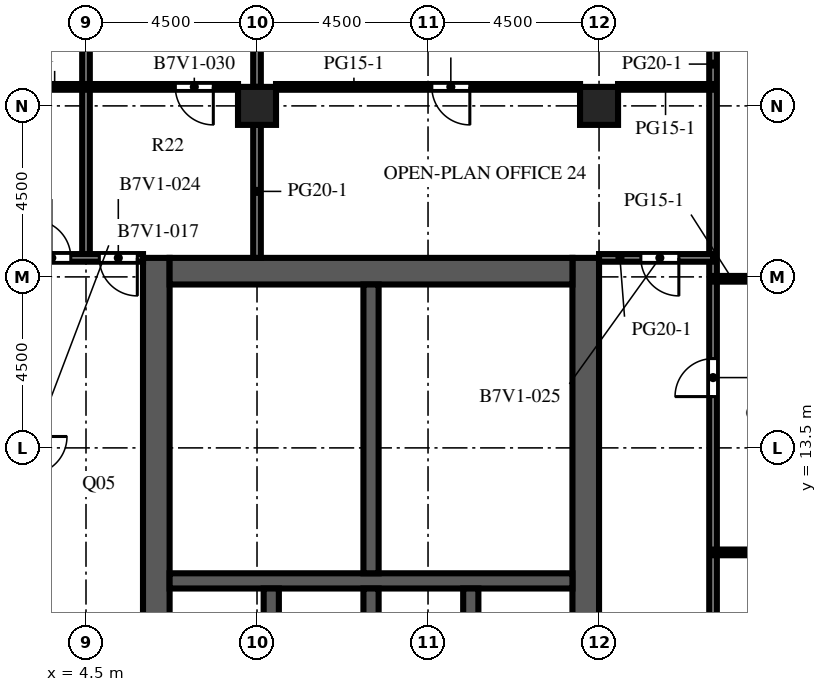
"""IFC4 building model, lengths in metres.
Left out: names, types, materials, properties, quantities, classifications, styles, units other than length and angle.
Written with IfcOpenShell. Run it as: python <this file> out.ifc"""

import sys

from ifc_helpers import new_model, si_unit, direction, frame, frame_2d, origin, origin_2d, place, context, subcontext, project, spatial, rectangle, extrude, element, fill, save


model = new_model("IFC4")
c1 = context("Model", 3, precision=1e-05, world=origin(), true_north=direction((0.0, 1.0)))
c2 = subcontext(c1, "Body", "Model", "MODEL_VIEW")
j1 = project(units=[si_unit("LENGTHUNIT", "METRE"), si_unit("PLANEANGLEUNIT", "RADIAN")], contexts=[c1])
p1 = place(None, origin())
s1 = spatial("IfcSite", under=j1, at=p1, CompositionType="ELEMENT")
p2 = place(p1, origin())
s2 = spatial("IfcBuilding", under=s1, at=p2, CompositionType="ELEMENT")
p3 = place(p2, frame((0.0, 0.0, 252.1)))
s3 = spatial("IfcBuildingStorey", under=s2, at=p3, CompositionType="ELEMENT", Elevation=252.1)
for number, where, z_axis, x_axis in (
    (1, (9.0, 22.5, 0.0), (0.0, 0.0, 1.0), (1.0, 0.0, 0.0)),
    (2, (18.0, 22.5, 0.0), (0.0, 0.0, 1.0), (1.0, 0.0, 0.0)),
):
    element("IfcColumn", number, at=place(p3, frame(where, z_axis=z_axis, x_axis=x_axis)), inside=s3, PredefinedType="COLUMN", context=c2, shape_type="SweptSolid", body=[
        extrude(rectangle(XDim=1.0, YDim=1.0, at=origin_2d()), origin(), (0.0, 0.0, 1.0), 4.1),
    ])
p4 = place(p3, frame((6.35, -9.0, 0.0), z_axis=(0.0, 0.0, 1.0), x_axis=(0.0, 1.0, 0.0)))
e3 = element("IfcWall", 3, at=p4, inside=s3, PredefinedType="SHEAR", context=c2, shape_type="SweptSolid", body=[
    extrude(rectangle(XDim=27.5, YDim=0.7, at=frame_2d((13.75, 0.0))), origin(), (0.0, 0.0, 1.0), 4.1),
])
p5 = place(p4, frame((12.55, 0.0, 0.0)))
e4 = element("IfcOpeningElement", 4, at=p5, cuts=e3, PredefinedType="OPENING", context=c2, shape_type="SweptSolid", body=[
    extrude(rectangle(XDim=2.4, YDim=2.4, at=frame_2d((1.2, 1.2))), frame((0.0, 0.36, 0.0), z_axis=(0.0, -1.0, 0.0), x_axis=(1.0, 0.0, 0.0)), (0.0, 0.0, 1.0), 0.72),
])
p6 = place(p4, frame((3.9, 0.0, 0.0)))
e5 = element("IfcOpeningElement", 5, at=p6, cuts=e3, PredefinedType="OPENING", context=c2, shape_type="SweptSolid", body=[
    extrude(rectangle(XDim=1.2, YDim=2.1, at=frame_2d((0.6, 1.05))), frame((0.0, 0.36, 0.0), z_axis=(0.0, -1.0, 0.0), x_axis=(1.0, 0.0, 0.0)), (0.0, 0.0, 1.0), 0.72),
])
p7 = place(p4, frame((22.4, 0.0, 0.0)))
e6 = element("IfcOpeningElement", 6, at=p7, cuts=e3, PredefinedType="OPENING", context=c2, shape_type="SweptSolid", body=[
    extrude(rectangle(XDim=1.2, YDim=2.1, at=frame_2d((0.6, 1.05))), frame((0.0, 0.36, 0.0), z_axis=(0.0, -1.0, 0.0), x_axis=(1.0, 0.0, 0.0)), (0.0, 0.0, 1.0), 0.72),
])
p8 = place(p3, frame((17.65, -9.0, 0.0), z_axis=(0.0, 0.0, 1.0), x_axis=(0.0, 1.0, 0.0)))
e7 = element("IfcWall", 7, at=p8, inside=s3, PredefinedType="SHEAR", context=c2, shape_type="SweptSolid", body=[
    extrude(rectangle(XDim=27.5, YDim=0.7, at=frame_2d((13.75, 0.0))), origin(), (0.0, 0.0, 1.0), 4.1),
])
p9 = place(p8, frame((12.55, 0.0, 0.0)))
e8 = element("IfcOpeningElement", 8, at=p9, cuts=e7, PredefinedType="OPENING", context=c2, shape_type="SweptSolid", body=[
    extrude(rectangle(XDim=2.4, YDim=2.4, at=frame_2d((1.2, 1.2))), frame((0.0, 0.36, 0.0), z_axis=(0.0, -1.0, 0.0), x_axis=(1.0, 0.0, 0.0)), (0.0, 0.0, 1.0), 0.72),
])
p10 = place(p8, frame((6.825, 0.0, 0.0)))
e9 = element("IfcOpeningElement", 9, at=p10, cuts=e7, PredefinedType="OPENING", context=c2, shape_type="SweptSolid", body=[
    extrude(rectangle(XDim=1.2, YDim=2.1, at=frame_2d((0.6, 1.05))), frame((0.0, 0.36, 0.0), z_axis=(0.0, -1.0, 0.0), x_axis=(1.0, 0.0, 0.0)), (0.0, 0.0, 1.0), 0.72),
])
p11 = place(p8, frame((19.475, 0.0, 0.0)))
e10 = element("IfcOpeningElement", 10, at=p11, cuts=e7, PredefinedType="OPENING", context=c2, shape_type="SweptSolid", body=[
    extrude(rectangle(XDim=1.2, YDim=2.1, at=frame_2d((0.6, 1.05))), frame((0.0, 0.36, 0.0), z_axis=(0.0, -1.0, 0.0), x_axis=(1.0, 0.0, 0.0)), (0.0, 0.0, 1.0), 0.72),
])
p12 = place(p3, frame((6.7, 18.15, 0.0), z_axis=(0.0, 0.0, 1.0), x_axis=(1.0, 0.0, 0.0)))
e11 = element("IfcWall", 11, at=p12, inside=s3, PredefinedType="SHEAR", context=c2, shape_type="SweptSolid", body=[
    extrude(rectangle(XDim=10.6, YDim=0.7, at=frame_2d((5.3, 0.0))), origin(), (0.0, 0.0, 1.0), 4.1),
])
p13 = place(p3, frame((6.7, 10.0, 0.0), z_axis=(0.0, 0.0, 1.0), x_axis=(1.0, 0.0, 0.0)))
e12 = element("IfcWall", 12, at=p13, inside=s3, PredefinedType="SHEAR", context=c2, shape_type="SweptSolid", body=[
    extrude(rectangle(XDim=10.6, YDim=0.4, at=frame_2d((5.3, 0.0))), origin(), (0.0, 0.0, 1.0), 4.1),
])
for number, where, z_axis, x_axis in (
    (13, (9.375, 6.9, 0.0), (0.0, 0.0, 1.0), (0.0, 1.0, 0.0)),
    (14, (12.0, 6.9, 0.0), (0.0, 0.0, 1.0), (0.0, 1.0, 0.0)),
    (15, (14.625, 6.9, 0.0), (0.0, 0.0, 1.0), (0.0, 1.0, 0.0)),
):
    element("IfcWall", number, at=place(p3, frame(where, z_axis=z_axis, x_axis=x_axis)), inside=s3, PredefinedType="SHEAR", context=c2, shape_type="SweptSolid", body=[
        extrude(rectangle(XDim=2.9, YDim=0.4, at=frame_2d((1.45, 0.0))), origin(), (0.0, 0.0, 1.0), 4.1),
    ])
p14 = place(p3, frame((12.0, 10.2, 0.0), z_axis=(0.0, 0.0, 1.0), x_axis=(0.0, 1.0, 0.0)))
e16 = element("IfcWall", 16, at=p14, inside=s3, PredefinedType="SHEAR", context=c2, shape_type="SweptSolid", body=[
    extrude(rectangle(XDim=7.6, YDim=0.4, at=frame_2d((3.8, 0.0))), origin(), (0.0, 0.0, 1.0), 4.1),
])
p15 = place(p3, frame((8.1, 10.2, 0.0), z_axis=(0.0, 0.0, 1.0), x_axis=(0.0, 1.0, 0.0)))
e17 = element("IfcWall", 17, at=p15, inside=s3, PredefinedType="PARTITIONING", context=c2, shape_type="SweptSolid", body=[
    extrude(rectangle(XDim=2.28, YDim=0.1, at=frame_2d((1.14, 0.0))), origin(), (0.0, 0.0, 1.0), 3.65),
])
p16 = place(p15, frame((0.64, 0.0, 0.0)))
e18 = element("IfcOpeningElement", 18, at=p16, cuts=e17, PredefinedType="OPENING", context=c2, shape_type="SweptSolid", body=[
    extrude(rectangle(XDim=1.0, YDim=2.1, at=frame_2d((0.5, 1.05))), frame((0.0, 0.06, 0.0), z_axis=(0.0, -1.0, 0.0), x_axis=(1.0, 0.0, 0.0)), (0.0, 0.0, 1.0), 0.12),
])
p17 = place(p3, frame((8.1, 12.48, 0.0), z_axis=(0.0, 0.0, 1.0), x_axis=(0.0, 1.0, 0.0)))
e19 = element("IfcWall", 19, at=p17, inside=s3, PredefinedType="PARTITIONING", context=c2, shape_type="SweptSolid", body=[
    extrude(rectangle(XDim=2.432, YDim=0.1, at=frame_2d((1.216, 0.0))), origin(), (0.0, 0.0, 1.0), 3.65),
])
p18 = place(p17, frame((0.716, 0.0, 0.0)))
e20 = element("IfcOpeningElement", 20, at=p18, cuts=e19, PredefinedType="OPENING", context=c2, shape_type="SweptSolid", body=[
    extrude(rectangle(XDim=1.0, YDim=2.1, at=frame_2d((0.5, 1.05))), frame((0.0, 0.06, 0.0), z_axis=(0.0, -1.0, 0.0), x_axis=(1.0, 0.0, 0.0)), (0.0, 0.0, 1.0), 0.12),
])
p19 = place(p3, frame((8.1, 14.912, 0.0), z_axis=(0.0, 0.0, 1.0), x_axis=(0.0, 1.0, 0.0)))
e21 = element("IfcWall", 21, at=p19, inside=s3, PredefinedType="PARTITIONING", context=c2, shape_type="SweptSolid", body=[
    extrude(rectangle(XDim=2.888, YDim=0.1, at=frame_2d((1.444, 0.0))), origin(), (0.0, 0.0, 1.0), 3.65),
])
p20 = place(p19, frame((0.944, 0.0, 0.0)))
e22 = element("IfcOpeningElement", 22, at=p20, cuts=e21, PredefinedType="OPENING", context=c2, shape_type="SweptSolid", body=[
    extrude(rectangle(XDim=1.0, YDim=2.1, at=frame_2d((0.5, 1.05))), frame((0.0, 0.06, 0.0), z_axis=(0.0, -1.0, 0.0), x_axis=(1.0, 0.0, 0.0)), (0.0, 0.0, 1.0), 0.12),
])
for number, where, z_axis, x_axis in (
    (23, (8.1, 12.48, 0.0), (0.0, 0.0, 1.0), (1.0, 0.0, 0.0)),
    (24, (8.1, 14.912, 0.0), (0.0, 0.0, 1.0), (1.0, 0.0, 0.0)),
):
    element("IfcWall", number, at=place(p3, frame(where, z_axis=z_axis, x_axis=x_axis)), inside=s3, PredefinedType="PARTITIONING", context=c2, shape_type="SweptSolid", body=[
        extrude(rectangle(XDim=3.7, YDim=0.1, at=frame_2d((1.85, 0.0))), origin(), (0.0, 0.0, 1.0), 3.65),
    ])
p21 = place(p3, frame((4.5, 18.5, 0.0), z_axis=(0.0, 0.0, 1.0), x_axis=(0.0, 1.0, 0.0)))
e25 = element("IfcWall", 25, at=p21, inside=s3, PredefinedType="PARTITIONING", context=c2, shape_type="SweptSolid", body=[
    extrude(rectangle(XDim=12.6, YDim=0.2, at=frame_2d((6.3, 0.0))), origin(), (0.0, 0.0, 1.0), 3.65),
])
for number, where, z_axis, x_axis in (
    (26, (9.0, 18.5, 0.0), (0.0, 0.0, 1.0), (0.0, 1.0, 0.0)),
    (27, (9.0, 23.0, 0.0), (0.0, 0.0, 1.0), (0.0, 1.0, 0.0)),
):
    element("IfcWall", number, at=place(p3, frame(where, z_axis=z_axis, x_axis=x_axis)), inside=s3, PredefinedType="PARTITIONING", context=c2, shape_type="SweptSolid", body=[
        extrude(rectangle(XDim=3.5, YDim=0.2, at=frame_2d((1.75, 0.0))), origin(), (0.0, 0.0, 1.0), 3.65),
    ])
p22 = place(p3, frame((21.0, 31.35, 0.0), z_axis=(0.0, 0.0, 1.0), x_axis=(0.0, -1.0, 0.0)))
e28 = element("IfcWall", 28, at=p22, inside=s3, PredefinedType="PARTITIONING", context=c2, shape_type="SweptSolid", body=[
    extrude(rectangle(XDim=25.1, YDim=0.2, at=frame_2d((12.55, 0.0))), origin(), (0.0, 0.0, 1.0), 3.65),
])
p23 = place(p22, frame((15.5, 0.0, 0.0)))
e29 = element("IfcOpeningElement", 29, at=p23, cuts=e28, PredefinedType="OPENING", context=c2, shape_type="SweptSolid", body=[
    extrude(rectangle(XDim=1.0, YDim=2.1, at=frame_2d((0.5, 1.05))), frame((0.0, 0.11, 0.0), z_axis=(0.0, -1.0, 0.0), x_axis=(1.0, 0.0, 0.0)), (0.0, 0.0, 1.0), 0.22),
])
p24 = place(p3, frame((26.85, 10.75, 0.0), z_axis=(0.0, 0.0, 1.0), x_axis=(-1.0, 0.0, 0.0)))
e30 = element("IfcWall", 30, at=p24, inside=s3, PredefinedType="PARTITIONING", context=c2, shape_type="SweptSolid", body=[
    extrude(rectangle(XDim=5.85, YDim=0.15, at=frame_2d((2.925, 0.0))), origin(), (0.0, 0.0, 1.0), 3.65),
])
p25 = place(p24, frame((2.0, 0.0, 0.0)))
e31 = element("IfcOpeningElement", 31, at=p25, cuts=e30, PredefinedType="OPENING", context=c2, shape_type="SweptSolid", body=[
    extrude(rectangle(XDim=1.0, YDim=2.1, at=frame_2d((0.5, 1.05))), frame((0.0, 0.085, 0.0), z_axis=(0.0, -1.0, 0.0), x_axis=(1.0, 0.0, 0.0)), (0.0, 0.0, 1.0), 0.17),
])
p26 = place(p3, frame((21.0, 17.95, 0.0), z_axis=(0.0, 0.0, 1.0), x_axis=(1.0, 0.0, 0.0)))
e32 = element("IfcWall", 32, at=p26, inside=s3, PredefinedType="PARTITIONING", context=c2, shape_type="SweptSolid", body=[
    extrude(rectangle(XDim=1.0, YDim=0.15, at=frame_2d((0.5, 0.0))), origin(), (0.0, 0.0, 1.0), 3.65),
])
p27 = place(p3, frame((1.5, 18.5, 0.0), z_axis=(0.0, 0.0, 1.0), x_axis=(1.0, 0.0, 0.0)))
e33 = element("IfcWall", 33, at=p27, inside=s3, PredefinedType="PARTITIONING", context=c2, shape_type="SweptSolid", body=[
    extrude(rectangle(XDim=4.5, YDim=0.2, at=frame_2d((2.25, 0.0))), origin(), (0.0, 0.0, 1.0), 3.65),
])
p28 = place(p27, frame((1.6, 0.0, 0.0)))
e34 = element("IfcOpeningElement", 34, at=p28, cuts=e33, PredefinedType="OPENING", context=c2, shape_type="SweptSolid", body=[
    extrude(rectangle(XDim=1.0, YDim=2.1, at=frame_2d((0.5, 1.05))), frame((0.0, 0.11, 0.0), z_axis=(0.0, -1.0, 0.0), x_axis=(1.0, 0.0, 0.0)), (0.0, 0.0, 1.0), 0.22),
])
p29 = place(p27, frame((3.35, 0.0, 0.0)))
e35 = element("IfcOpeningElement", 35, at=p29, cuts=e33, PredefinedType="OPENING", context=c2, shape_type="SweptSolid", body=[
    extrude(rectangle(XDim=1.0, YDim=2.1, at=frame_2d((0.5, 1.05))), frame((0.0, 0.11, 0.0), z_axis=(0.0, -1.0, 0.0), x_axis=(1.0, 0.0, 0.0)), (0.0, 0.0, 1.0), 0.22),
])
p30 = place(p3, frame((18.0, 18.5, 0.0), z_axis=(0.0, 0.0, 1.0), x_axis=(1.0, 0.0, 0.0)))
e36 = element("IfcWall", 36, at=p30, inside=s3, PredefinedType="PARTITIONING", context=c2, shape_type="SweptSolid", body=[
    extrude(rectangle(XDim=3.0, YDim=0.2, at=frame_2d((1.5, 0.0))), origin(), (0.0, 0.0, 1.0), 3.65),
])
p31 = place(p30, frame((1.1, 0.0, 0.0)))
e37 = element("IfcOpeningElement", 37, at=p31, cuts=e36, PredefinedType="OPENING", context=c2, shape_type="SweptSolid", body=[
    extrude(rectangle(XDim=1.0, YDim=2.1, at=frame_2d((0.5, 1.05))), frame((0.0, 0.11, 0.0), z_axis=(0.0, -1.0, 0.0), x_axis=(1.0, 0.0, 0.0)), (0.0, 0.0, 1.0), 0.22),
])
p32 = place(p3, frame((0.5, 23.0, 0.0), z_axis=(0.0, 0.0, 1.0), x_axis=(1.0, 0.0, 0.0)))
e38 = element("IfcWall", 38, at=p32, inside=s3, PredefinedType="PARTITIONING", context=c2, shape_type="SweptSolid", body=[
    extrude(rectangle(XDim=8.0, YDim=0.15, at=frame_2d((4.0, 0.0))), origin(), (0.0, 0.0, 1.0), 3.65),
])
p33 = place(p32, frame((6.35, 0.0, 0.0)))
e39 = element("IfcOpeningElement", 39, at=p33, cuts=e38, PredefinedType="OPENING", context=c2, shape_type="SweptSolid", body=[
    extrude(rectangle(XDim=1.0, YDim=2.1, at=frame_2d((0.5, 1.05))), frame((0.0, 0.085, 0.0), z_axis=(0.0, -1.0, 0.0), x_axis=(1.0, 0.0, 0.0)), (0.0, 0.0, 1.0), 0.17),
])
p34 = place(p3, frame((9.5, 23.0, 0.0), z_axis=(0.0, 0.0, 1.0), x_axis=(1.0, 0.0, 0.0)))
e40 = element("IfcWall", 40, at=p34, inside=s3, PredefinedType="PARTITIONING", context=c2, shape_type="SweptSolid", body=[
    extrude(rectangle(XDim=8.0, YDim=0.15, at=frame_2d((4.0, 0.0))), origin(), (0.0, 0.0, 1.0), 3.65),
])
p35 = place(p34, frame((4.1, 0.0, 0.0)))
e41 = element("IfcOpeningElement", 41, at=p35, cuts=e40, PredefinedType="OPENING", context=c2, shape_type="SweptSolid", body=[
    extrude(rectangle(XDim=1.0, YDim=2.1, at=frame_2d((0.5, 1.05))), frame((0.0, 0.085, 0.0), z_axis=(0.0, -1.0, 0.0), x_axis=(1.0, 0.0, 0.0)), (0.0, 0.0, 1.0), 0.17),
])
p36 = place(p3, frame((18.5, 23.0, 0.0), z_axis=(0.0, 0.0, 1.0), x_axis=(1.0, 0.0, 0.0)))
e42 = element("IfcWall", 42, at=p36, inside=s3, PredefinedType="PARTITIONING", context=c2, shape_type="SweptSolid", body=[
    extrude(rectangle(XDim=2.5, YDim=0.15, at=frame_2d((1.25, 0.0))), origin(), (0.0, 0.0, 1.0), 3.65),
])
p37 = place(p11, frame((1.2, 0.0, 0.0), z_axis=(0.0, 0.0, 1.0), x_axis=(-1.0, 0.0, 0.0)))
e43 = element("IfcDoor", 43, at=p37, inside=s3, OperationType="SINGLE_SWING_LEFT", PredefinedType="DOOR", context=c2, shape_type="SweptSolid", body=[
    extrude(rectangle(XDim=1.2, YDim=2.1, at=frame_2d((0.6, 1.05))), frame((0.0, 0.025, 0.0), z_axis=(0.0, -1.0, 0.0), x_axis=(1.0, 0.0, 0.0)), (0.0, 0.0, 1.0), 0.05),
])
fill(e10, e43)
p38 = place(p7, origin())
e44 = element("IfcDoor", 44, at=p38, inside=s3, OperationType="SINGLE_SWING_RIGHT", PredefinedType="DOOR", context=c2, shape_type="SweptSolid", body=[
    extrude(rectangle(XDim=1.2, YDim=2.1, at=frame_2d((0.6, 1.05))), frame((0.0, -0.275, 0.0), z_axis=(0.0, -1.0, 0.0), x_axis=(1.0, 0.0, 0.0)), (0.0, 0.0, 1.0), 0.05),
])
fill(e6, e44)
p39 = place(p16, origin())
e45 = element("IfcDoor", 45, at=p39, inside=s3, OperationType="SINGLE_SWING_LEFT", PredefinedType="DOOR", context=c2, shape_type="SweptSolid", body=[
    extrude(rectangle(XDim=1.0, YDim=2.1, at=frame_2d((0.5, 1.05))), frame((0.0, 0.025, 0.0), z_axis=(0.0, -1.0, 0.0), x_axis=(1.0, 0.0, 0.0)), (0.0, 0.0, 1.0), 0.05),
])
fill(e18, e45)
p40 = place(p18, origin())
e46 = element("IfcDoor", 46, at=p40, inside=s3, OperationType="SINGLE_SWING_RIGHT", PredefinedType="DOOR", context=c2, shape_type="SweptSolid", body=[
    extrude(rectangle(XDim=1.0, YDim=2.1, at=frame_2d((0.5, 1.05))), frame((0.0, 0.025, 0.0), z_axis=(0.0, -1.0, 0.0), x_axis=(1.0, 0.0, 0.0)), (0.0, 0.0, 1.0), 0.05),
])
fill(e20, e46)
p41 = place(p20, origin())
e47 = element("IfcDoor", 47, at=p41, inside=s3, OperationType="SINGLE_SWING_LEFT", PredefinedType="DOOR", context=c2, shape_type="SweptSolid", body=[
    extrude(rectangle(XDim=1.0, YDim=2.1, at=frame_2d((0.5, 1.05))), frame((0.0, 0.025, 0.0), z_axis=(0.0, -1.0, 0.0), x_axis=(1.0, 0.0, 0.0)), (0.0, 0.0, 1.0), 0.05),
])
fill(e22, e47)
p42 = place(p28, origin())
e48 = element("IfcDoor", 48, at=p42, inside=s3, OperationType="SINGLE_SWING_LEFT", PredefinedType="DOOR", context=c2, shape_type="SweptSolid", body=[
    extrude(rectangle(XDim=1.0, YDim=2.1, at=frame_2d((0.5, 1.05))), frame((0.0, 0.025, 0.0), z_axis=(0.0, -1.0, 0.0), x_axis=(1.0, 0.0, 0.0)), (0.0, 0.0, 1.0), 0.05),
])
fill(e34, e48)
p43 = place(p29, origin())
e49 = element("IfcDoor", 49, at=p43, inside=s3, OperationType="SINGLE_SWING_RIGHT", PredefinedType="DOOR", context=c2, shape_type="SweptSolid", body=[
    extrude(rectangle(XDim=1.0, YDim=2.1, at=frame_2d((0.5, 1.05))), frame((0.0, 0.025, 0.0), z_axis=(0.0, -1.0, 0.0), x_axis=(1.0, 0.0, 0.0)), (0.0, 0.0, 1.0), 0.05),
])
fill(e35, e49)
p44 = place(p31, origin())
e50 = element("IfcDoor", 50, at=p44, inside=s3, OperationType="SINGLE_SWING_RIGHT", PredefinedType="DOOR", context=c2, shape_type="SweptSolid", body=[
    extrude(rectangle(XDim=1.0, YDim=2.1, at=frame_2d((0.5, 1.05))), frame((0.0, 0.025, 0.0), z_axis=(0.0, -1.0, 0.0), x_axis=(1.0, 0.0, 0.0)), (0.0, 0.0, 1.0), 0.05),
])
fill(e37, e50)
p45 = place(p23, origin())
e51 = element("IfcDoor", 51, at=p45, inside=s3, OperationType="SINGLE_SWING_RIGHT", PredefinedType="DOOR", context=c2, shape_type="SweptSolid", body=[
    extrude(rectangle(XDim=1.0, YDim=2.1, at=frame_2d((0.5, 1.05))), frame((0.0, 0.025, 0.0), z_axis=(0.0, -1.0, 0.0), x_axis=(1.0, 0.0, 0.0)), (0.0, 0.0, 1.0), 0.05),
])
fill(e29, e51)
p46 = place(p33, origin())
e52 = element("IfcDoor", 52, at=p46, inside=s3, OperationType="SINGLE_SWING_RIGHT", PredefinedType="DOOR", context=c2, shape_type="SweptSolid", body=[
    extrude(rectangle(XDim=1.0, YDim=2.1, at=frame_2d((0.5, 1.05))), frame((0.0, 0.025, 0.0), z_axis=(0.0, -1.0, 0.0), x_axis=(1.0, 0.0, 0.0)), (0.0, 0.0, 1.0), 0.05),
])
fill(e39, e52)
p47 = place(p35, origin())
e53 = element("IfcDoor", 53, at=p47, inside=s3, OperationType="SINGLE_SWING_RIGHT", PredefinedType="DOOR", context=c2, shape_type="SweptSolid", body=[
    extrude(rectangle(XDim=1.0, YDim=2.1, at=frame_2d((0.5, 1.05))), frame((0.0, 0.025, 0.0), z_axis=(0.0, -1.0, 0.0), x_axis=(1.0, 0.0, 0.0)), (0.0, 0.0, 1.0), 0.05),
])
fill(e41, e53)
save(model, sys.argv[1])
